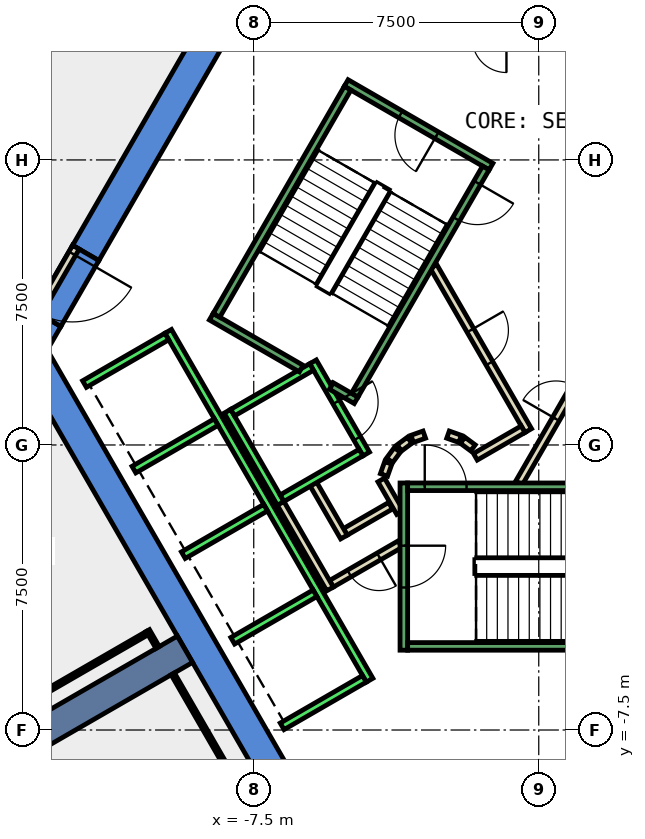
"""IFC4 building model, lengths in metres.
Left out: names, types, materials, properties, quantities, classifications, styles, units other than length and angle.
Written with IfcOpenShell. Run it as: python <this file> out.ifc"""

import sys

from ifc_helpers import new_model, si_unit, direction, frame, frame_2d, origin, place, context, subcontext, project, spatial, polyline, rectangle, outline, extrude, element, fill, save


model = new_model("IFC4")
c1 = context("Model", 3, precision=1e-05, world=origin(), true_north=direction((0.0, 1.0)))
c2 = subcontext(c1, "Body", "Model", "MODEL_VIEW")
j1 = project(units=[si_unit("LENGTHUNIT", "METRE"), si_unit("PLANEANGLEUNIT", "RADIAN")], contexts=[c1])
p1 = place(None, origin())
s1 = spatial("IfcSite", under=j1, at=p1, CompositionType="ELEMENT")
p2 = place(p1, origin())
s2 = spatial("IfcBuilding", under=s1, at=p2, CompositionType="ELEMENT")
p3 = place(p2, frame((0.0, 0.0, 142.4)))
s3 = spatial("IfcBuildingStorey", under=s2, at=p3, CompositionType="ELEMENT", Elevation=142.4)
p4 = place(p3, frame((0.0, 0.0, -0.4)))
e1 = element("IfcWall", 1, at=p4, inside=s3, PredefinedType="SHEAR", context=c2, shape_type="SweptSolid", body=[
    extrude(outline(polyline([(-12.267, 5.252), (-11.575, 4.852), (-6.466, 13.7), (-6.928, 14.5), (-12.267, 5.252)])), origin(), (0.0, 0.0, 1.0), 4.2),
])
p5 = place(p3, frame((0.0, 0.0, -0.4)))
e2 = element("IfcWall", 2, at=p5, inside=s3, PredefinedType="SHEAR", context=c2, shape_type="SweptSolid", body=[
    extrude(outline(polyline([(-12.575, 3.12), (-13.267, 3.52), (-13.856, 2.5), (-12.933, 2.5), (-12.575, 3.12)])), origin(), (0.0, 0.0, 1.0), 4.2),
])
p6 = place(p3, frame((0.0, 0.0, 3.6)))
e3 = element("IfcWall", 3, at=p6, inside=s3, PredefinedType="SHEAR", context=c2, shape_type="SweptSolid", body=[
    extrude(outline(polyline([(-13.267, 3.52), (-12.575, 3.12), (-11.575, 4.852), (-12.267, 5.252), (-13.267, 3.52)])), origin(), (0.0, 0.0, 1.0), 0.2),
])
p7 = place(p3, frame((0.0, 0.0, -0.4)))
e4 = element("IfcWall", 4, at=p7, inside=s3, PredefinedType="SHEAR", context=c2, shape_type="SweptSolid", body=[
    extrude(outline(polyline([(-13.856, 2.5), (-6.928, -9.5), (-6.466, -8.7), (-12.933, 2.5), (-13.856, 2.5)])), origin(), (0.0, 0.0, 1.0), 4.2),
])
p8 = place(p3, frame((-9.31, -5.375, -0.4), z_axis=(0.0, 0.0, 1.0), x_axis=(-0.866017533419, -0.500013631625, 0.0)))
e5 = element("IfcWall", 5, at=p8, inside=s3, PredefinedType="SHEAR", context=c2, shape_type="SweptSolid", body=[
    extrude(rectangle(XDim=9.0, YDim=0.8, at=frame_2d((4.5, 0.0))), origin(), (0.0, 0.0, 1.0), 4.2),
])
p9 = place(p3, frame((-3.9, -1.599, 0.0), z_axis=(0.0, 0.0, 1.0), x_axis=(-0.865969445389, -0.500096910261, 0.0)))
e6 = element("IfcWall", 6, at=p9, inside=s3, PredefinedType="PARTITIONING", context=c2, shape_type="SweptSolid", body=[
    extrude(rectangle(XDim=1.373, YDim=0.2, at=frame_2d((0.687, 0.0))), origin(), (0.0, 0.0, 1.0), 3.8),
])
p10 = place(p3, frame((-5.126, -2.422, 0.0), z_axis=(0.0, 0.0, 1.0), x_axis=(-0.500062241894, 0.865989465428, 0.0)))
e7 = element("IfcWall", 7, at=p10, inside=s3, PredefinedType="PARTITIONING", context=c2, shape_type="SweptSolid", body=[
    extrude(rectangle(XDim=1.7, YDim=0.2, at=frame_2d((0.85, 0.0))), origin(), (0.0, 0.0, 1.0), 3.8),
])
p11 = place(p3, frame((-3.65, -2.61, 0.0), z_axis=(0.0, 0.0, 1.0), x_axis=(-0.866072462134, -0.499918483688, 0.0)))
e8 = element("IfcWall", 8, at=p11, inside=s3, PredefinedType="PARTITIONING", context=c2, shape_type="SweptSolid", body=[
    extrude(rectangle(XDim=2.084, YDim=0.2, at=frame_2d((1.042, 0.0))), origin(), (0.0, 0.0, 1.0), 3.8),
])
p12 = place(p11, frame((0.642, 0.0, 0.0)))
e9 = element("IfcOpeningElement", 9, at=p12, cuts=e8, PredefinedType="OPENING", context=c2, shape_type="SweptSolid", body=[
    extrude(rectangle(XDim=0.9, YDim=2.1, at=frame_2d((0.45, 1.05))), frame((0.0, 0.11, 0.0), z_axis=(0.0, -1.0, 0.0), x_axis=(1.0, 0.0, 0.0)), (0.0, 0.0, 1.0), 0.22),
])
p13 = place(p3, frame((-5.492, -3.788, 0.0), z_axis=(0.0, 0.0, 1.0), x_axis=(-0.500008949224, 0.866020236886, 0.0)))
e10 = element("IfcWall", 10, at=p13, inside=s3, PredefinedType="PARTITIONING", context=c2, shape_type="SweptSolid", body=[
    extrude(rectangle(XDim=2.68, YDim=0.2, at=frame_2d((1.34, 0.0))), origin(), (0.0, 0.0, 1.0), 3.8),
])
p14 = place(p3, frame((-4.145, -0.92, 0.0), z_axis=(0.0, 0.0, 1.0), x_axis=(0.499743786207, -0.866173278362, 0.0)))
e11 = element("IfcWall", 11, at=p14, inside=s3, PredefinedType="PARTITIONING", context=c2, shape_type="SweptSolid", body=[
    extrude(rectangle(XDim=0.991, YDim=0.2, at=frame_2d((0.495, 0.0))), origin(), (0.0, 0.0, 1.0), 3.8),
])
p15 = place(p3, frame((-0.52, -1.0, 0.0), z_axis=(0.0, 0.0, 1.0), x_axis=(0.50011622646, 0.865958290007, 0.0)))
e12 = element("IfcWall", 12, at=p15, inside=s3, PredefinedType="PARTITIONING", context=c2, shape_type="SweptSolid", body=[
    extrude(rectangle(XDim=4.991, YDim=0.2, at=frame_2d((2.496, 0.0))), origin(), (0.0, 0.0, 1.0), 3.8),
])
p16 = place(p15, frame((1.945, 0.0, 0.0)))
e13 = element("IfcOpeningElement", 13, at=p16, cuts=e12, PredefinedType="OPENING", context=c2, shape_type="SweptSolid", body=[
    extrude(rectangle(XDim=1.0, YDim=2.1, at=frame_2d((0.5, 1.05))), frame((0.0, 0.11, 0.0), z_axis=(0.0, -1.0, 0.0), x_axis=(1.0, 0.0, 0.0)), (0.0, 0.0, 1.0), 0.22),
])
p17 = place(p3, frame((-2.771, 4.7, 0.0), z_axis=(0.0, 0.0, 1.0), x_axis=(0.499969479948, -0.866043023828, 0.0)))
e14 = element("IfcWall", 14, at=p17, inside=s3, PredefinedType="PARTITIONING", context=c2, shape_type="SweptSolid", body=[
    extrude(rectangle(XDim=4.99, YDim=0.2, at=frame_2d((2.495, 0.0))), origin(), (0.0, 0.0, 1.0), 3.8),
])
p18 = place(p17, frame((1.945, 0.0, 0.0)))
e15 = element("IfcOpeningElement", 15, at=p18, cuts=e14, PredefinedType="OPENING", context=c2, shape_type="SweptSolid", body=[
    extrude(rectangle(XDim=1.0, YDim=2.1, at=frame_2d((0.5, 1.05))), frame((0.0, 0.11, 0.0), z_axis=(0.0, -1.0, 0.0), x_axis=(1.0, 0.0, 0.0)), (0.0, 0.0, 1.0), 0.22),
])
p19 = place(p3, frame((-0.412, 0.414, 0.0), z_axis=(0.0, 0.0, 1.0), x_axis=(-0.866017369001, -0.500013916395, 0.0)))
e16 = element("IfcWall", 16, at=p19, inside=s3, PredefinedType="PARTITIONING", context=c2, shape_type="SweptSolid", body=[
    extrude(rectangle(XDim=1.45, YDim=0.2, at=frame_2d((0.725, 0.0))), origin(), (0.0, 0.0, 1.0), 3.8),
])
p20 = place(p3, frame((-1.731, -0.077, 0.0), z_axis=(0.0, 0.0, 1.0), x_axis=(-0.804311165252, 0.594208338422, 0.0)))
e17 = element("IfcWall", 17, at=p20, inside=s3, PredefinedType="PARTITIONING", context=c2, shape_type="SweptSolid", body=[
    extrude(rectangle(XDim=0.338, YDim=0.2, at=frame_2d((0.169, 0.0))), origin(), (0.0, 0.0, 1.0), 3.8),
])
p21 = place(p3, frame((-2.07, 0.16, 0.0), z_axis=(0.0, 0.0, 1.0), x_axis=(-0.942199461132, 0.335052496547, 0.0)))
e18 = element("IfcWall", 18, at=p21, inside=s3, PredefinedType="PARTITIONING", context=c2, shape_type="SweptSolid", body=[
    extrude(rectangle(XDim=0.337, YDim=0.2, at=frame_2d((0.169, 0.0))), origin(), (0.0, 0.0, 1.0), 3.8),
])
p22 = place(p3, frame((-3.012, 0.273, 0.0), z_axis=(0.0, 0.0, 1.0), x_axis=(-0.942280615813, -0.334824194261, 0.0)))
e19 = element("IfcWall", 19, at=p22, inside=s3, PredefinedType="PARTITIONING", context=c2, shape_type="SweptSolid", body=[
    extrude(rectangle(XDim=0.338, YDim=0.2, at=frame_2d((0.169, 0.0))), origin(), (0.0, 0.0, 1.0), 3.8),
])
p23 = place(p3, frame((-3.397, 0.124, 0.0), z_axis=(0.0, 0.0, 1.0), x_axis=(-0.804311165252, -0.594208338422, 0.0)))
e20 = element("IfcWall", 20, at=p23, inside=s3, PredefinedType="PARTITIONING", context=c2, shape_type="SweptSolid", body=[
    extrude(rectangle(XDim=0.338, YDim=0.2, at=frame_2d((0.169, 0.0))), origin(), (0.0, 0.0, 1.0), 3.8),
])
p24 = place(p3, frame((-3.723, -0.131, 0.0), z_axis=(0.0, 0.0, 1.0), x_axis=(-0.594675113454, -0.803966112121, 0.0)))
e21 = element("IfcWall", 21, at=p24, inside=s3, PredefinedType="PARTITIONING", context=c2, shape_type="SweptSolid", body=[
    extrude(rectangle(XDim=0.338, YDim=0.2, at=frame_2d((0.169, 0.0))), origin(), (0.0, 0.0, 1.0), 3.8),
])
p25 = place(p3, frame((-3.96, -0.47, 0.0), z_axis=(0.0, 0.0, 1.0), x_axis=(-0.334824194261, -0.942280615813, 0.0)))
e22 = element("IfcWall", 22, at=p25, inside=s3, PredefinedType="PARTITIONING", context=c2, shape_type="SweptSolid", body=[
    extrude(rectangle(XDim=0.338, YDim=0.2, at=frame_2d((0.169, 0.0))), origin(), (0.0, 0.0, 1.0), 3.8),
])
p26 = place(p3, frame((-7.572, -9.586, 0.0), z_axis=(0.0, 0.0, 1.0), x_axis=(-0.500037407586, 0.866003805427, 0.0)))
e23 = element("IfcWall", 23, at=p26, inside=s3, PredefinedType="PARTITIONING", context=c2, shape_type="SweptSolid", body=[
    extrude(rectangle(XDim=4.115, YDim=0.1, at=frame_2d((2.058, 0.0))), origin(), (0.0, 0.0, 1.0), 3.8),
])
p27 = place(p3, frame((-10.305, -4.951, 0.0), z_axis=(0.0, 0.0, 1.0), x_axis=(-0.866031185235, -0.4999899861, 0.0)))
e24 = element("IfcWall", 24, at=p27, inside=s3, PredefinedType="PARTITIONING", context=c2, shape_type="SweptSolid", body=[
    extrude(rectangle(XDim=4.95, YDim=0.1, at=frame_2d((2.475, 0.0))), origin(), (0.0, 0.0, 1.0), 3.8),
])
p28 = place(p3, frame((-12.18, 5.202, 0.0), z_axis=(0.0, 0.0, 1.0), x_axis=(-0.50002537861, -0.866010750942, 0.0)))
e25 = element("IfcWall", 25, at=p28, inside=s3, PredefinedType="PARTITIONING", context=c2, shape_type="SweptSolid", body=[
    extrude(rectangle(XDim=2.0, YDim=0.2, at=frame_2d((1.0, 0.0))), origin(), (0.0, 0.0, 1.0), 2.4),
])
p29 = place(p28, frame((0.19, 0.0, 0.0)))
e26 = element("IfcOpeningElement", 26, at=p29, cuts=e25, PredefinedType="OPENING", context=c2, shape_type="SweptSolid", body=[
    extrude(rectangle(XDim=1.8, YDim=2.1, at=frame_2d((0.9, 1.05))), frame((0.0, 0.11, 0.0), z_axis=(0.0, -1.0, 0.0), x_axis=(1.0, 0.0, 0.0)), (0.0, 0.0, 1.0), 0.22),
])
p30 = place(p3, frame((-10.03, -5.329, 0.0), z_axis=(0.0, 0.0, 1.0), x_axis=(-0.499352927503, 0.866398669086, 0.0)))
e27 = element("IfcWall", 27, at=p30, inside=s3, PredefinedType="PARTITIONING", context=c2, shape_type="SweptSolid", body=[
    extrude(rectangle(XDim=0.515, YDim=0.1, at=frame_2d((0.257, 0.0))), origin(), (0.0, 0.0, 1.0), 3.8),
])
p31 = place(p3, frame((-5.94, 2.188, 0.0), z_axis=(0.0, 0.0, 1.0), x_axis=(0.49994636267, -0.866056369097, 0.0)))
e28 = element("IfcWall", 28, at=p31, inside=s3, PredefinedType="STANDARD", context=c2, shape_type="SweptSolid", body=[
    extrude(rectangle(XDim=2.8, YDim=0.2, at=frame_2d((1.4, 0.0))), origin(), (0.0, 0.0, 1.0), 3.8),
])
p32 = place(p31, frame((1.225, 0.0, 0.0)))
e29 = element("IfcOpeningElement", 29, at=p32, cuts=e28, PredefinedType="OPENING", context=c2, shape_type="SweptSolid", body=[
    extrude(rectangle(XDim=1.1, YDim=2.1, at=frame_2d((0.55, 1.05))), frame((0.0, 0.11, 0.0), z_axis=(0.0, -1.0, 0.0), x_axis=(1.0, 0.0, 0.0)), (0.0, 0.0, 1.0), 0.22),
])
p33 = place(p3, frame((-8.192, 0.888, 0.0), z_axis=(0.0, 0.0, 1.0), x_axis=(0.49994636267, -0.866056369097, 0.0)))
e30 = element("IfcWall", 30, at=p33, inside=s3, PredefinedType="STANDARD", context=c2, shape_type="SweptSolid", body=[
    extrude(rectangle(XDim=2.8, YDim=0.2, at=frame_2d((1.4, 0.0))), origin(), (0.0, 0.0, 1.0), 3.8),
])
for number, where, z_axis, x_axis in (
    (31, (-5.977, 2.052, 0.0), (0.0, 0.0, 1.0), (-0.866, -0.5, 0.0)),
    (32, (-4.677, -0.2, 0.0), (0.0, 0.0, 1.0), (-0.866, -0.5, 0.0)),
):
    element("IfcWall", number, at=place(p3, frame(where, z_axis=z_axis, x_axis=x_axis)), inside=s3, PredefinedType="STANDARD", context=c2, shape_type="SweptSolid", body=[
        extrude(rectangle(XDim=2.399, YDim=0.2, at=frame_2d((1.2, 0.0))), origin(), (0.0, 0.0, 1.0), 3.8),
    ])
p34 = place(p3, frame((-9.751, 2.99, 0.0), z_axis=(0.0, 0.0, 1.0), x_axis=(0.50000090737, -0.866024879913, 0.0)))
e33 = element("IfcWall", 33, at=p34, inside=s3, PredefinedType="STANDARD", context=c2, shape_type="SweptSolid", body=[
    extrude(rectangle(XDim=10.6, YDim=0.2, at=frame_2d((5.3, 0.0))), origin(), (0.0, 0.0, 1.0), 3.8),
])
p35 = place(p3, frame((-9.788, 2.853, 0.0), z_axis=(0.0, 0.0, 1.0), x_axis=(-0.865998541277, -0.500046524342, 0.0)))
e34 = element("IfcWall", 34, at=p35, inside=s3, PredefinedType="STANDARD", context=c2, shape_type="SweptSolid", body=[
    extrude(rectangle(XDim=2.5, YDim=0.2, at=frame_2d((1.25, 0.0))), origin(), (0.0, 0.0, 1.0), 3.8),
])
for number, where, z_axis, x_axis in (
    (35, (-8.488, 0.602, 0.0), (0.0, 0.0, 1.0), (-0.866, -0.5, 0.0)),
    (36, (-7.188, -1.65, 0.0), (0.0, 0.0, 1.0), (-0.866, -0.5, 0.0)),
    (37, (-5.888, -3.902, 0.0), (0.0, 0.0, 1.0), (-0.866, -0.5, 0.0)),
    (38, (-4.588, -6.153, 0.0), (0.0, 0.0, 1.0), (-0.866, -0.5, 0.0)),
):
    element("IfcWall", number, at=place(p3, frame(where, z_axis=z_axis, x_axis=x_axis)), inside=s3, PredefinedType="STANDARD", context=c2, shape_type="SweptSolid", body=[
        extrude(rectangle(XDim=2.5, YDim=0.2, at=frame_2d((1.25, 0.0))), origin(), (0.0, 0.0, 1.0), 3.8),
    ])
p36 = place(p3, frame((-3.55, -1.0, 0.0), z_axis=(0.0, 0.0, 1.0), x_axis=(0.0, -1.0, 0.0)))
e39 = element("IfcWall", 39, at=p36, inside=s3, PredefinedType="STANDARD", context=c2, shape_type="SweptSolid", body=[
    extrude(rectangle(XDim=4.4, YDim=0.2, at=frame_2d((2.2, 0.0))), origin(), (0.0, 0.0, 1.0), 3.8),
])
p37 = place(p36, frame((1.65, 0.0, 0.0)))
e40 = element("IfcOpeningElement", 40, at=p37, cuts=e39, PredefinedType="OPENING", context=c2, shape_type="SweptSolid", body=[
    extrude(rectangle(XDim=1.1, YDim=2.2, at=frame_2d((0.55, 1.1))), frame((0.0, 0.11, 0.0), z_axis=(0.0, -1.0, 0.0), x_axis=(1.0, 0.0, 0.0)), (0.0, 0.0, 1.0), 0.22),
])
p38 = place(p3, frame((-3.45, -1.1, 0.0), z_axis=(0.0, 0.0, 1.0), x_axis=(1.0, 0.0, 0.0)))
e41 = element("IfcWall", 41, at=p38, inside=s3, PredefinedType="STANDARD", context=c2, shape_type="SweptSolid", body=[
    extrude(rectangle(XDim=6.9, YDim=0.2, at=frame_2d((3.45, 0.0))), origin(), (0.0, 0.0, 1.0), 3.8),
])
p39 = place(p38, frame((0.45, 0.0, 0.0)))
e42 = element("IfcOpeningElement", 42, at=p39, cuts=e41, PredefinedType="OPENING", context=c2, shape_type="SweptSolid", body=[
    extrude(rectangle(XDim=1.1, YDim=2.2, at=frame_2d((0.55, 1.1))), frame((0.0, 0.11, 0.0), z_axis=(0.0, -1.0, 0.0), x_axis=(1.0, 0.0, 0.0)), (0.0, 0.0, 1.0), 0.22),
])
p40 = place(p3, frame((-3.45, -5.3, 0.0), z_axis=(0.0, 0.0, 1.0), x_axis=(1.0, 0.0, 0.0)))
e43 = element("IfcWall", 43, at=p40, inside=s3, PredefinedType="STANDARD", context=c2, shape_type="SweptSolid", body=[
    extrude(rectangle(XDim=6.9, YDim=0.2, at=frame_2d((3.45, 0.0))), origin(), (0.0, 0.0, 1.0), 3.8),
])
p41 = place(p3, frame((-1.256, 7.324, 0.0), z_axis=(0.0, 0.0, 1.0), x_axis=(-0.866046073146, 0.499964197906, 0.0)))
e44 = element("IfcWall", 44, at=p41, inside=s3, PredefinedType="STANDARD", context=c2, shape_type="SweptSolid", body=[
    extrude(rectangle(XDim=4.4, YDim=0.2, at=frame_2d((2.2, 0.0))), origin(), (0.0, 0.0, 1.0), 3.8),
])
p42 = place(p41, frame((1.65, 0.0, 0.0)))
e45 = element("IfcOpeningElement", 45, at=p42, cuts=e44, PredefinedType="OPENING", context=c2, shape_type="SweptSolid", body=[
    extrude(rectangle(XDim=1.1, YDim=2.2, at=frame_2d((0.55, 1.1))), frame((0.0, 0.11, 0.0), z_axis=(0.0, -1.0, 0.0), x_axis=(1.0, 0.0, 0.0)), (0.0, 0.0, 1.0), 0.22),
])
p43 = place(p3, frame((-6.25, 2.01, 0.0), z_axis=(0.0, 0.0, 1.0), x_axis=(-0.86611865017, 0.499838457731, 0.0)))
e46 = element("IfcWall", 46, at=p43, inside=s3, PredefinedType="STANDARD", context=c2, shape_type="SweptSolid", body=[
    extrude(rectangle(XDim=2.733, YDim=0.2, at=frame_2d((1.366, 0.0))), origin(), (0.0, 0.0, 1.0), 3.8),
])
p44 = place(p3, frame((-4.806, 1.176, 0.0), z_axis=(0.0, 0.0, 1.0), x_axis=(-0.866558586415, 0.499075361355, 0.0)))
e47 = element("IfcWall", 47, at=p44, inside=s3, PredefinedType="STANDARD", context=c2, shape_type="SweptSolid", body=[
    extrude(rectangle(XDim=0.751, YDim=0.2, at=frame_2d((0.376, 0.0))), origin(), (0.0, 0.0, 1.0), 3.8),
])
p45 = place(p3, frame((-1.393, 7.288, 0.0), z_axis=(0.0, 0.0, 1.0), x_axis=(-0.499963383562, -0.866046543262, 0.0)))
e48 = element("IfcWall", 48, at=p45, inside=s3, PredefinedType="STANDARD", context=c2, shape_type="SweptSolid", body=[
    extrude(rectangle(XDim=6.9, YDim=0.2, at=frame_2d((3.45, 0.0))), origin(), (0.0, 0.0, 1.0), 3.8),
])
p46 = place(p45, frame((0.45, 0.0, 0.0)))
e49 = element("IfcOpeningElement", 49, at=p46, cuts=e48, PredefinedType="OPENING", context=c2, shape_type="SweptSolid", body=[
    extrude(rectangle(XDim=1.1, YDim=2.2, at=frame_2d((0.55, 1.1))), frame((0.0, 0.11, 0.0), z_axis=(0.0, -1.0, 0.0), x_axis=(1.0, 0.0, 0.0)), (0.0, 0.0, 1.0), 0.22),
])
p47 = place(p3, frame((-5.03, 9.388, 0.0), z_axis=(0.0, 0.0, 1.0), x_axis=(-0.499978703459, -0.866037698999, 0.0)))
e50 = element("IfcWall", 50, at=p47, inside=s3, PredefinedType="STANDARD", context=c2, shape_type="SweptSolid", body=[
    extrude(rectangle(XDim=6.9, YDim=0.2, at=frame_2d((3.45, 0.0))), origin(), (0.0, 0.0, 1.0), 3.8),
])
p48 = place(p16, origin())
e51 = element("IfcDoor", 51, at=p48, inside=s3, OperationType="SINGLE_SWING_LEFT", PredefinedType="DOOR", context=c2, shape_type="SweptSolid", body=[
    extrude(rectangle(XDim=1.0, YDim=2.1, at=frame_2d((0.5, 1.05))), frame((0.0, 0.025, 0.0), z_axis=(0.0, -1.0, 0.0), x_axis=(1.0, 0.0, 0.0)), (0.0, 0.0, 1.0), 0.05),
])
fill(e13, e51)
p49 = place(p18, origin())
e52 = element("IfcDoor", 52, at=p49, inside=s3, OperationType="SINGLE_SWING_RIGHT", PredefinedType="DOOR", context=c2, shape_type="SweptSolid", body=[
    extrude(rectangle(XDim=1.0, YDim=2.1, at=frame_2d((0.5, 1.05))), frame((0.0, 0.025, 0.0), z_axis=(0.0, -1.0, 0.0), x_axis=(1.0, 0.0, 0.0)), (0.0, 0.0, 1.0), 0.05),
])
fill(e15, e52)
p50 = place(p12, origin())
e53 = element("IfcDoor", 53, at=p50, inside=s3, OperationType="SINGLE_SWING_LEFT", PredefinedType="DOOR", context=c2, shape_type="SweptSolid", body=[
    extrude(rectangle(XDim=0.9, YDim=2.1, at=frame_2d((0.45, 1.05))), frame((0.0, 0.025, 0.0), z_axis=(0.0, -1.0, 0.0), x_axis=(1.0, 0.0, 0.0)), (0.0, 0.0, 1.0), 0.05),
])
fill(e9, e53)
p51 = place(p29, origin())
e54 = element("IfcDoor", 54, at=p51, inside=s3, OperationType="DOUBLE_DOOR_SINGLE_SWING", PredefinedType="DOOR", context=c2, shape_type="SweptSolid", body=[
    extrude(rectangle(XDim=1.8, YDim=2.1, at=frame_2d((0.9, 1.05))), frame((0.0, 0.025, 0.0), z_axis=(0.0, -1.0, 0.0), x_axis=(1.0, 0.0, 0.0)), (0.0, 0.0, 1.0), 0.05),
])
fill(e26, e54)
p52 = place(p32, origin())
e55 = element("IfcDoor", 55, at=p52, inside=s3, OperationType="SLIDING_TO_LEFT", PredefinedType="DOOR", context=c2, shape_type="SweptSolid", body=[
    extrude(rectangle(XDim=1.1, YDim=2.1, at=frame_2d((0.55, 1.05))), frame((0.0, 0.025, 0.0), z_axis=(0.0, -1.0, 0.0), x_axis=(1.0, 0.0, 0.0)), (0.0, 0.0, 1.0), 0.05),
])
fill(e29, e55)
p53 = place(p39, origin())
e56 = element("IfcDoor", 56, at=p53, inside=s3, OperationType="SINGLE_SWING_LEFT", PredefinedType="DOOR", context=c2, shape_type="SweptSolid", body=[
    extrude(rectangle(XDim=1.1, YDim=2.2, at=frame_2d((0.55, 1.1))), frame((0.0, 0.025, 0.0), z_axis=(0.0, -1.0, 0.0), x_axis=(1.0, 0.0, 0.0)), (0.0, 0.0, 1.0), 0.05),
])
fill(e42, e56)
p54 = place(p37, origin())
e57 = element("IfcDoor", 57, at=p54, inside=s3, OperationType="SINGLE_SWING_LEFT", PredefinedType="DOOR", context=c2, shape_type="SweptSolid", body=[
    extrude(rectangle(XDim=1.1, YDim=2.2, at=frame_2d((0.55, 1.1))), frame((0.0, 0.025, 0.0), z_axis=(0.0, -1.0, 0.0), x_axis=(1.0, 0.0, 0.0)), (0.0, 0.0, 1.0), 0.05),
])
fill(e40, e57)
p55 = place(p46, origin())
e58 = element("IfcDoor", 58, at=p55, inside=s3, OperationType="SINGLE_SWING_LEFT", PredefinedType="DOOR", context=c2, shape_type="SweptSolid", body=[
    extrude(rectangle(XDim=1.1, YDim=2.2, at=frame_2d((0.55, 1.1))), frame((0.0, 0.025, 0.0), z_axis=(0.0, -1.0, 0.0), x_axis=(1.0, 0.0, 0.0)), (0.0, 0.0, 1.0), 0.05),
])
fill(e49, e58)
p56 = place(p42, origin())
e59 = element("IfcDoor", 59, at=p56, inside=s3, OperationType="SINGLE_SWING_LEFT", PredefinedType="DOOR", context=c2, shape_type="SweptSolid", body=[
    extrude(rectangle(XDim=1.1, YDim=2.2, at=frame_2d((0.55, 1.1))), frame((0.0, 0.025, 0.0), z_axis=(0.0, -1.0, 0.0), x_axis=(1.0, 0.0, 0.0)), (0.0, 0.0, 1.0), 0.05),
])
fill(e45, e59)
save(model, sys.argv[1])
